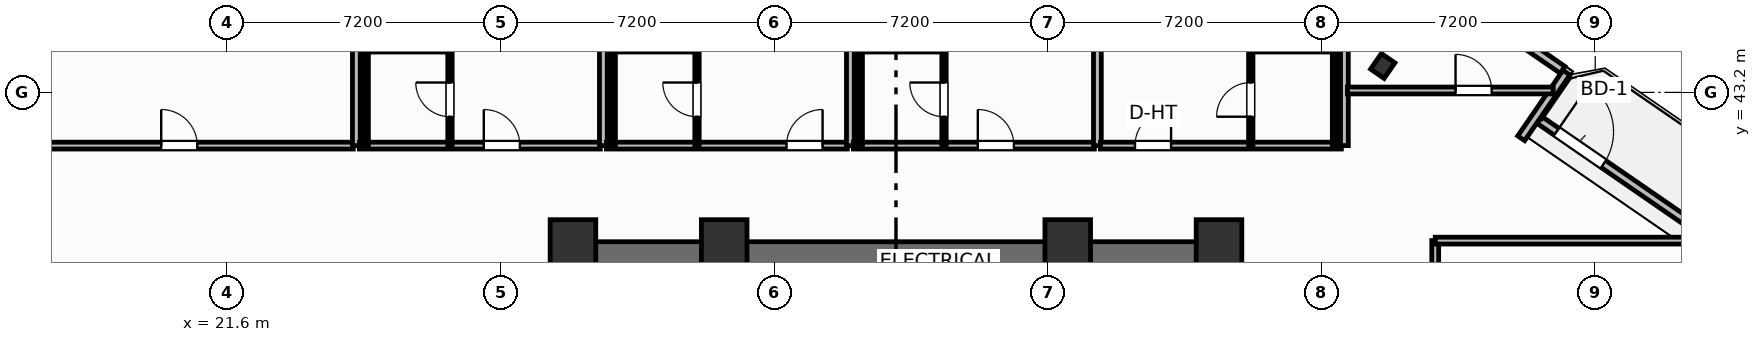
"""IFC4 building model, lengths in metres.
Left out: names, types, materials, properties, quantities, classifications, styles, units other than length and angle.
Written with IfcOpenShell. Run it as: python <this file> out.ifc"""

import sys

from ifc_helpers import new_model, si_unit, direction, frame, frame_2d, origin, origin_2d, place, context, subcontext, project, spatial, rectangle, i_section, extrude, element, fill, save


model = new_model("IFC4")
c1 = context("Model", 3, precision=1e-05, world=origin(), true_north=direction((0.0, 1.0)))
c2 = subcontext(c1, "Body", "Model", "MODEL_VIEW")
j1 = project(units=[si_unit("LENGTHUNIT", "METRE"), si_unit("PLANEANGLEUNIT", "RADIAN")], contexts=[c1])
p1 = place(None, origin())
s1 = spatial("IfcSite", under=j1, at=p1, CompositionType="ELEMENT")
p2 = place(p1, origin())
s2 = spatial("IfcBuilding", under=s1, at=p2, CompositionType="ELEMENT")
p3 = place(p2, frame((0.0, 0.0, 67.7)))
s3 = spatial("IfcBuildingStorey", under=s2, at=p3, CompositionType="ELEMENT", Elevation=67.7)
for number, where, z_axis, x_axis in (
    (1, (30.7, 39.05, 0.0), (0.0, 0.0, 1.0), (1.0, 0.0, 0.0)),
    (2, (34.68, 39.05, 0.0), (0.0, 0.0, 1.0), (1.0, 0.0, 0.0)),
    (3, (43.72, 39.05, 0.0), (0.0, 0.0, 1.0), (1.0, 0.0, 0.0)),
    (4, (47.7, 39.05, 0.0), (0.0, 0.0, 1.0), (1.0, 0.0, 0.0)),
):
    element("IfcColumn", number, at=place(p3, frame(where, z_axis=z_axis, x_axis=x_axis)), inside=s3, PredefinedType="COLUMN", context=c2, shape_type="SweptSolid", body=[
        extrude(rectangle(XDim=1.2, YDim=1.6, at=origin_2d()), origin(), (0.0, 0.0, 1.0), 3.7),
    ])
p4 = place(p3, frame((30.28, 38.845, 0.0), z_axis=(0.0, 0.0, 1.0), x_axis=(1.0, 0.0, 0.0)))
e5 = element("IfcWall", 5, at=p4, inside=s3, PredefinedType="SHEAR", context=c2, shape_type="SweptSolid", body=[
    extrude(rectangle(XDim=17.84, YDim=0.85, at=frame_2d((8.92, 0.0))), origin(), (0.0, 0.0, 1.0), 3.38),
])
p5 = place(p3, frame((52.009, 43.896, 0.0), z_axis=(0.0, 0.0, 1.0), x_axis=(0.823532597628, -0.567268949127, 0.0)))
e6 = element("IfcColumn", 6, at=p5, inside=s3, PredefinedType="COLUMN", context=c2, shape_type="SweptSolid", body=[
    extrude(i_section(OverallWidth=0.432, OverallDepth=0.498, WebThickness=0.056, FlangeThickness=0.089, FilletRadius=0.025, at=origin_2d()), origin(), (0.0, 0.0, 1.0), 3.7),
])
p6 = place(p3, frame((56.132, 42.476, 0.0), z_axis=(0.0, 0.0, 1.0), x_axis=(0.823534636215, -0.567265989598, 0.0)))
e7 = element("IfcWall", 7, at=p6, inside=s3, PredefinedType="SOLIDWALL", context=c2, shape_type="SweptSolid", body=[
    extrude(rectangle(XDim=6.0, YDim=0.22, at=frame_2d((3.0, 0.0))), origin(), (0.0, 0.0, 1.0), 2.66),
])
p7 = place(p6, frame((0.548, 0.0, 0.0)))
e8 = element("IfcOpeningElement", 8, at=p7, cuts=e7, PredefinedType="OPENING", context=c2, shape_type="SweptSolid", body=[
    extrude(rectangle(XDim=1.5, YDim=2.25, at=frame_2d((0.75, 1.125))), frame((0.0, 0.12, 0.0), z_axis=(0.0, -1.0, 0.0), x_axis=(1.0, 0.0, 0.0)), (0.0, 0.0, 1.0), 0.24),
])
p8 = place(p3, frame((55.653, 41.993, 0.0), z_axis=(0.0, 0.0, 1.0), x_axis=(0.567273696173, 0.823529327729, 0.0)))
e9 = element("IfcWall", 9, at=p8, inside=s3, PredefinedType="SOLIDWALL", context=c2, shape_type="SweptSolid", body=[
    extrude(rectangle(XDim=2.1, YDim=0.22, at=frame_2d((1.05, 0.0))), origin(), (0.0, 0.0, 1.0), 2.66),
])
p9 = place(p3, frame((56.741, 43.793, 0.0), z_axis=(0.0, 0.0, 1.0), x_axis=(-0.823530942962, 0.56727135128, 0.0)))
e10 = element("IfcWall", 10, at=p9, inside=s3, PredefinedType="SOLIDWALL", context=c2, shape_type="SweptSolid", body=[
    extrude(rectangle(XDim=8.035, YDim=0.22, at=frame_2d((4.018, 0.0))), origin(), (0.0, 0.0, 1.0), 2.66),
])
p10 = place(p9, frame((3.192, 0.0, 0.8)))
e11 = element("IfcOpeningElement", 11, at=p10, cuts=e10, PredefinedType="OPENING", context=c2, shape_type="SweptSolid", body=[
    extrude(rectangle(XDim=1.65, YDim=1.65, at=frame_2d((0.825, 0.825))), frame((0.0, 0.12, 0.0), z_axis=(0.0, -1.0, 0.0), x_axis=(1.0, 0.0, 0.0)), (0.0, 0.0, 1.0), 0.24),
])
p11 = place(p3, frame((3.176, 41.8, 0.0), z_axis=(0.0, 0.0, 1.0), x_axis=(1.0, 0.0, 0.0)))
e12 = element("IfcWall", 12, at=p11, inside=s3, PredefinedType="PARTITIONING", context=c2, shape_type="SweptSolid", body=[
    extrude(rectangle(XDim=21.744, YDim=0.18, at=frame_2d((10.872, 0.0))), origin(), (0.0, 0.0, 1.0), 3.38),
])
p12 = place(p11, frame((16.689, 0.0, 0.0)))
e13 = element("IfcOpeningElement", 13, at=p12, cuts=e12, PredefinedType="OPENING", context=c2, shape_type="SweptSolid", body=[
    extrude(rectangle(XDim=0.95, YDim=2.05, at=frame_2d((0.475, 1.025))), frame((0.0, 0.1, 0.0), z_axis=(0.0, -1.0, 0.0), x_axis=(1.0, 0.0, 0.0)), (0.0, 0.0, 1.0), 0.2),
])
p13 = place(p3, frame((25.0, 41.8, 0.0), z_axis=(0.0, 0.0, 1.0), x_axis=(0.0, 1.0, 0.0)))
e14 = element("IfcWall", 14, at=p13, inside=s3, PredefinedType="PARTITIONING", context=c2, shape_type="SweptSolid", body=[
    extrude(rectangle(XDim=14.2, YDim=0.205, at=frame_2d((7.1, 0.0))), origin(), (0.0, 0.0, 1.0), 3.38),
])
p14 = place(p3, frame((25.08, 41.8, 0.0), z_axis=(0.0, 0.0, 1.0), x_axis=(1.0, 0.0, 0.0)))
e15 = element("IfcWall", 15, at=p14, inside=s3, PredefinedType="PARTITIONING", context=c2, shape_type="SweptSolid", body=[
    extrude(rectangle(XDim=6.34, YDim=0.18, at=frame_2d((3.17, 0.0))), origin(), (0.0, 0.0, 1.0), 3.38),
])
p15 = place(p14, frame((3.274, 0.0, 0.0)))
e16 = element("IfcOpeningElement", 16, at=p15, cuts=e15, PredefinedType="OPENING", context=c2, shape_type="SweptSolid", body=[
    extrude(rectangle(XDim=0.95, YDim=2.15, at=frame_2d((0.475, 1.075))), frame((0.0, 0.1, 0.0), z_axis=(0.0, -1.0, 0.0), x_axis=(1.0, 0.0, 0.0)), (0.0, 0.0, 1.0), 0.2),
])
p16 = place(p3, frame((27.464, 41.8, 0.0), z_axis=(0.0, 0.0, 1.0), x_axis=(0.0, 1.0, 0.0)))
e17 = element("IfcWall", 17, at=p16, inside=s3, PredefinedType="PARTITIONING", context=c2, shape_type="SweptSolid", body=[
    extrude(rectangle(XDim=2.52, YDim=0.115, at=frame_2d((1.26, 0.0))), origin(), (0.0, 0.0, 1.0), 3.38),
])
p17 = place(p16, frame((0.76, 0.0, 0.0)))
e18 = element("IfcOpeningElement", 18, at=p17, cuts=e17, PredefinedType="OPENING", context=c2, shape_type="SweptSolid", body=[
    extrude(rectangle(XDim=0.9, YDim=2.05, at=frame_2d((0.45, 1.025))), frame((0.0, 0.067, 0.0), z_axis=(0.0, -1.0, 0.0), x_axis=(1.0, 0.0, 0.0)), (0.0, 0.0, 1.0), 0.135),
])
p18 = place(p3, frame((25.26, 41.8, 0.0), z_axis=(0.0, 0.0, 1.0), x_axis=(0.0, 1.0, 0.0)))
e19 = element("IfcWall", 19, at=p18, inside=s3, PredefinedType="PARTITIONING", context=c2, shape_type="SweptSolid", body=[
    extrude(rectangle(XDim=2.52, YDim=0.115, at=frame_2d((1.26, 0.0))), origin(), (0.0, 0.0, 1.0), 3.38),
])
p19 = place(p3, frame((31.5, 41.8, 0.0), z_axis=(0.0, 0.0, 1.0), x_axis=(0.0, 1.0, 0.0)))
e20 = element("IfcWall", 20, at=p19, inside=s3, PredefinedType="PARTITIONING", context=c2, shape_type="SweptSolid", body=[
    extrude(rectangle(XDim=14.2, YDim=0.205, at=frame_2d((7.1, 0.0))), origin(), (0.0, 0.0, 1.0), 3.38),
])
p20 = place(p3, frame((31.58, 41.8, 0.0), z_axis=(0.0, 0.0, 1.0), x_axis=(1.0, 0.0, 0.0)))
e21 = element("IfcWall", 21, at=p20, inside=s3, PredefinedType="PARTITIONING", context=c2, shape_type="SweptSolid", body=[
    extrude(rectangle(XDim=6.34, YDim=0.18, at=frame_2d((3.17, 0.0))), origin(), (0.0, 0.0, 1.0), 3.38),
])
p21 = place(p20, frame((4.739, 0.0, 0.0)))
e22 = element("IfcOpeningElement", 22, at=p21, cuts=e21, PredefinedType="OPENING", context=c2, shape_type="SweptSolid", body=[
    extrude(rectangle(XDim=0.95, YDim=2.15, at=frame_2d((0.475, 1.075))), frame((0.0, 0.1, 0.0), z_axis=(0.0, -1.0, 0.0), x_axis=(1.0, 0.0, 0.0)), (0.0, 0.0, 1.0), 0.2),
])
p22 = place(p3, frame((33.964, 41.8, 0.0), z_axis=(0.0, 0.0, 1.0), x_axis=(0.0, 1.0, 0.0)))
e23 = element("IfcWall", 23, at=p22, inside=s3, PredefinedType="PARTITIONING", context=c2, shape_type="SweptSolid", body=[
    extrude(rectangle(XDim=2.52, YDim=0.115, at=frame_2d((1.26, 0.0))), origin(), (0.0, 0.0, 1.0), 3.38),
])
p23 = place(p22, frame((0.76, 0.0, 0.0)))
e24 = element("IfcOpeningElement", 24, at=p23, cuts=e23, PredefinedType="OPENING", context=c2, shape_type="SweptSolid", body=[
    extrude(rectangle(XDim=0.9, YDim=2.05, at=frame_2d((0.45, 1.025))), frame((0.0, 0.067, 0.0), z_axis=(0.0, -1.0, 0.0), x_axis=(1.0, 0.0, 0.0)), (0.0, 0.0, 1.0), 0.135),
])
p24 = place(p3, frame((31.76, 41.8, 0.0), z_axis=(0.0, 0.0, 1.0), x_axis=(0.0, 1.0, 0.0)))
e25 = element("IfcWall", 25, at=p24, inside=s3, PredefinedType="PARTITIONING", context=c2, shape_type="SweptSolid", body=[
    extrude(rectangle(XDim=2.52, YDim=0.115, at=frame_2d((1.26, 0.0))), origin(), (0.0, 0.0, 1.0), 3.38),
])
p25 = place(p3, frame((38.0, 41.8, 0.0), z_axis=(0.0, 0.0, 1.0), x_axis=(0.0, 1.0, 0.0)))
e26 = element("IfcWall", 26, at=p25, inside=s3, PredefinedType="PARTITIONING", context=c2, shape_type="SweptSolid", body=[
    extrude(rectangle(XDim=14.797, YDim=0.205, at=frame_2d((7.398, 0.0))), origin(), (0.0, 0.0, 1.0), 3.38),
])
p26 = place(p3, frame((38.08, 41.8, 0.0), z_axis=(0.0, 0.0, 1.0), x_axis=(1.0, 0.0, 0.0)))
e27 = element("IfcWall", 27, at=p26, inside=s3, PredefinedType="PARTITIONING", context=c2, shape_type="SweptSolid", body=[
    extrude(rectangle(XDim=6.34, YDim=0.18, at=frame_2d((3.17, 0.0))), origin(), (0.0, 0.0, 1.0), 3.38),
])
p27 = place(p26, frame((3.274, 0.0, 0.0)))
e28 = element("IfcOpeningElement", 28, at=p27, cuts=e27, PredefinedType="OPENING", context=c2, shape_type="SweptSolid", body=[
    extrude(rectangle(XDim=0.95, YDim=2.15, at=frame_2d((0.475, 1.075))), frame((0.0, 0.1, 0.0), z_axis=(0.0, -1.0, 0.0), x_axis=(1.0, 0.0, 0.0)), (0.0, 0.0, 1.0), 0.2),
])
p28 = place(p3, frame((40.464, 41.8, 0.0), z_axis=(0.0, 0.0, 1.0), x_axis=(0.0, 1.0, 0.0)))
e29 = element("IfcWall", 29, at=p28, inside=s3, PredefinedType="PARTITIONING", context=c2, shape_type="SweptSolid", body=[
    extrude(rectangle(XDim=2.52, YDim=0.115, at=frame_2d((1.26, 0.0))), origin(), (0.0, 0.0, 1.0), 3.38),
])
p29 = place(p28, frame((0.76, 0.0, 0.0)))
e30 = element("IfcOpeningElement", 30, at=p29, cuts=e29, PredefinedType="OPENING", context=c2, shape_type="SweptSolid", body=[
    extrude(rectangle(XDim=0.9, YDim=2.05, at=frame_2d((0.45, 1.025))), frame((0.0, 0.067, 0.0), z_axis=(0.0, -1.0, 0.0), x_axis=(1.0, 0.0, 0.0)), (0.0, 0.0, 1.0), 0.135),
])
p30 = place(p3, frame((38.26, 41.8, 0.0), z_axis=(0.0, 0.0, 1.0), x_axis=(0.0, 1.0, 0.0)))
e31 = element("IfcWall", 31, at=p30, inside=s3, PredefinedType="PARTITIONING", context=c2, shape_type="SweptSolid", body=[
    extrude(rectangle(XDim=2.52, YDim=0.115, at=frame_2d((1.26, 0.0))), origin(), (0.0, 0.0, 1.0), 3.38),
])
p31 = place(p3, frame((44.5, 41.8, 0.0), z_axis=(0.0, 0.0, 1.0), x_axis=(0.0, 1.0, 0.0)))
e32 = element("IfcWall", 32, at=p31, inside=s3, PredefinedType="PARTITIONING", context=c2, shape_type="SweptSolid", body=[
    extrude(rectangle(XDim=8.583, YDim=0.205, at=frame_2d((4.292, 0.0))), origin(), (0.0, 0.0, 1.0), 3.38),
])
p32 = place(p3, frame((44.58, 41.8, 0.0), z_axis=(0.0, 0.0, 1.0), x_axis=(1.0, 0.0, 0.0)))
e33 = element("IfcWall", 33, at=p32, inside=s3, PredefinedType="PARTITIONING", context=c2, shape_type="SweptSolid", body=[
    extrude(rectangle(XDim=6.34, YDim=0.18, at=frame_2d((3.17, 0.0))), origin(), (0.0, 0.0, 1.0), 3.38),
])
p33 = place(p32, frame((0.91, 0.0, 0.0)))
e34 = element("IfcOpeningElement", 34, at=p33, cuts=e33, PredefinedType="OPENING", context=c2, shape_type="SweptSolid", body=[
    extrude(rectangle(XDim=0.95, YDim=2.15, at=frame_2d((0.475, 1.075))), frame((0.0, 0.1, 0.0), z_axis=(0.0, -1.0, 0.0), x_axis=(1.0, 0.0, 0.0)), (0.0, 0.0, 1.0), 0.2),
])
p34 = place(p3, frame((48.536, 41.8, 0.0), z_axis=(0.0, 0.0, 1.0), x_axis=(0.0, 1.0, 0.0)))
e35 = element("IfcWall", 35, at=p34, inside=s3, PredefinedType="PARTITIONING", context=c2, shape_type="SweptSolid", body=[
    extrude(rectangle(XDim=2.52, YDim=0.115, at=frame_2d((1.26, 0.0))), origin(), (0.0, 0.0, 1.0), 3.38),
])
p35 = place(p34, frame((0.76, 0.0, 0.0)))
e36 = element("IfcOpeningElement", 36, at=p35, cuts=e35, PredefinedType="OPENING", context=c2, shape_type="SweptSolid", body=[
    extrude(rectangle(XDim=0.9, YDim=2.05, at=frame_2d((0.45, 1.025))), frame((0.0, 0.067, 0.0), z_axis=(0.0, -1.0, 0.0), x_axis=(1.0, 0.0, 0.0)), (0.0, 0.0, 1.0), 0.135),
])
p36 = place(p3, frame((50.74, 41.8, 0.0), z_axis=(0.0, 0.0, 1.0), x_axis=(0.0, 1.0, 0.0)))
e37 = element("IfcWall", 37, at=p36, inside=s3, PredefinedType="PARTITIONING", context=c2, shape_type="SweptSolid", body=[
    extrude(rectangle(XDim=2.52, YDim=0.115, at=frame_2d((1.26, 0.0))), origin(), (0.0, 0.0, 1.0), 3.38),
])
p37 = place(p3, frame((51.0, 41.8, 0.0), z_axis=(0.0, 0.0, 1.0), x_axis=(0.0, 1.0, 0.0)))
e38 = element("IfcWall", 38, at=p37, inside=s3, PredefinedType="PARTITIONING", context=c2, shape_type="SweptSolid", body=[
    extrude(rectangle(XDim=5.923, YDim=0.205, at=frame_2d((2.961, 0.0))), origin(), (0.0, 0.0, 1.0), 3.38),
])
p38 = place(p3, frame((51.08, 43.25, 0.0), z_axis=(0.0, 0.0, 1.0), x_axis=(1.0, 0.0, 0.0)))
e39 = element("IfcWall", 39, at=p38, inside=s3, PredefinedType="PARTITIONING", context=c2, shape_type="SweptSolid", body=[
    extrude(rectangle(XDim=5.414, YDim=0.18, at=frame_2d((2.707, 0.0))), origin(), (0.0, 0.0, 1.0), 3.38),
])
p39 = place(p38, frame((2.844, 0.0, 0.0)))
e40 = element("IfcOpeningElement", 40, at=p39, cuts=e39, PredefinedType="OPENING", context=c2, shape_type="SweptSolid", body=[
    extrude(rectangle(XDim=0.95, YDim=2.05, at=frame_2d((0.475, 1.025))), frame((0.0, 0.1, 0.0), z_axis=(0.0, -1.0, 0.0), x_axis=(1.0, 0.0, 0.0)), (0.0, 0.0, 1.0), 0.2),
])
p40 = place(p3, frame((53.39, 26.84, 0.0), z_axis=(0.0, 0.0, 1.0), x_axis=(0.0, 1.0, 0.0)))
e41 = element("IfcWall", 41, at=p40, inside=s3, PredefinedType="PARTITIONING", context=c2, shape_type="SweptSolid", body=[
    extrude(rectangle(XDim=12.46, YDim=0.18, at=frame_2d((6.23, 0.0))), origin(), (0.0, 0.0, 1.0), 3.38),
])
p41 = place(p40, frame((0.618, 0.0, 0.0)))
e42 = element("IfcOpeningElement", 42, at=p41, cuts=e41, PredefinedType="OPENING", context=c2, shape_type="SweptSolid", body=[
    extrude(rectangle(XDim=0.92, YDim=2.05, at=frame_2d((0.46, 1.025))), frame((0.0, 0.1, 0.0), z_axis=(0.0, -1.0, 0.0), x_axis=(1.0, 0.0, 0.0)), (0.0, 0.0, 1.0), 0.2),
])
p42 = place(p3, frame((53.39, 39.3, 0.0), z_axis=(0.0, 0.0, 1.0), x_axis=(1.0, 0.0, 0.0)))
e43 = element("IfcWall", 43, at=p42, inside=s3, PredefinedType="PARTITIONING", context=c2, shape_type="SweptSolid", body=[
    extrude(rectangle(XDim=7.313, YDim=0.18, at=frame_2d((3.656, 0.0))), origin(), (0.0, 0.0, 1.0), 3.38),
])
p43 = place(p7, origin())
e44 = element("IfcDoor", 44, at=p43, inside=s3, OperationType="SINGLE_SWING_LEFT", PredefinedType="DOOR", context=c2, shape_type="SweptSolid", body=[
    extrude(rectangle(XDim=1.5, YDim=2.25, at=frame_2d((0.75, 1.125))), frame((0.0, 0.025, 0.0), z_axis=(0.0, -1.0, 0.0), x_axis=(1.0, 0.0, 0.0)), (0.0, 0.0, 1.0), 0.05),
])
fill(e8, e44)
p44 = place(p12, origin())
e45 = element("IfcDoor", 45, at=p44, inside=s3, OperationType="SINGLE_SWING_LEFT", PredefinedType="DOOR", context=c2, shape_type="SweptSolid", body=[
    extrude(rectangle(XDim=0.95, YDim=2.05, at=frame_2d((0.475, 1.025))), frame((0.0, 0.025, 0.0), z_axis=(0.0, -1.0, 0.0), x_axis=(1.0, 0.0, 0.0)), (0.0, 0.0, 1.0), 0.05),
])
fill(e13, e45)
p45 = place(p15, origin())
e46 = element("IfcDoor", 46, at=p45, inside=s3, OperationType="SINGLE_SWING_LEFT", PredefinedType="DOOR", context=c2, shape_type="SweptSolid", body=[
    extrude(rectangle(XDim=0.95, YDim=2.15, at=frame_2d((0.475, 1.075))), frame((0.0, 0.025, 0.0), z_axis=(0.0, -1.0, 0.0), x_axis=(1.0, 0.0, 0.0)), (0.0, 0.0, 1.0), 0.05),
])
fill(e16, e46)
p46 = place(p17, origin())
e47 = element("IfcDoor", 47, at=p46, inside=s3, OperationType="SINGLE_SWING_RIGHT", PredefinedType="DOOR", context=c2, shape_type="SweptSolid", body=[
    extrude(rectangle(XDim=0.9, YDim=2.05, at=frame_2d((0.45, 1.025))), frame((0.0, 0.025, 0.0), z_axis=(0.0, -1.0, 0.0), x_axis=(1.0, 0.0, 0.0)), (0.0, 0.0, 1.0), 0.05),
])
fill(e18, e47)
p47 = place(p21, origin())
e48 = element("IfcDoor", 48, at=p47, inside=s3, OperationType="SINGLE_SWING_RIGHT", PredefinedType="DOOR", context=c2, shape_type="SweptSolid", body=[
    extrude(rectangle(XDim=0.95, YDim=2.15, at=frame_2d((0.475, 1.075))), frame((0.0, 0.025, 0.0), z_axis=(0.0, -1.0, 0.0), x_axis=(1.0, 0.0, 0.0)), (0.0, 0.0, 1.0), 0.05),
])
fill(e22, e48)
p48 = place(p23, origin())
e49 = element("IfcDoor", 49, at=p48, inside=s3, OperationType="SINGLE_SWING_RIGHT", PredefinedType="DOOR", context=c2, shape_type="SweptSolid", body=[
    extrude(rectangle(XDim=0.9, YDim=2.05, at=frame_2d((0.45, 1.025))), frame((0.0, 0.025, 0.0), z_axis=(0.0, -1.0, 0.0), x_axis=(1.0, 0.0, 0.0)), (0.0, 0.0, 1.0), 0.05),
])
fill(e24, e49)
p49 = place(p27, origin())
e50 = element("IfcDoor", 50, at=p49, inside=s3, OperationType="SINGLE_SWING_LEFT", PredefinedType="DOOR", context=c2, shape_type="SweptSolid", body=[
    extrude(rectangle(XDim=0.95, YDim=2.15, at=frame_2d((0.475, 1.075))), frame((0.0, 0.025, 0.0), z_axis=(0.0, -1.0, 0.0), x_axis=(1.0, 0.0, 0.0)), (0.0, 0.0, 1.0), 0.05),
])
fill(e28, e50)
p50 = place(p29, origin())
e51 = element("IfcDoor", 51, at=p50, inside=s3, OperationType="SINGLE_SWING_RIGHT", PredefinedType="DOOR", context=c2, shape_type="SweptSolid", body=[
    extrude(rectangle(XDim=0.9, YDim=2.05, at=frame_2d((0.45, 1.025))), frame((0.0, 0.025, 0.0), z_axis=(0.0, -1.0, 0.0), x_axis=(1.0, 0.0, 0.0)), (0.0, 0.0, 1.0), 0.05),
])
fill(e30, e51)
p51 = place(p33, origin())
e52 = element("IfcDoor", 52, at=p51, inside=s3, OperationType="SINGLE_SWING_RIGHT", PredefinedType="DOOR", context=c2, shape_type="SweptSolid", body=[
    extrude(rectangle(XDim=0.95, YDim=2.15, at=frame_2d((0.475, 1.075))), frame((0.0, 0.025, 0.0), z_axis=(0.0, -1.0, 0.0), x_axis=(1.0, 0.0, 0.0)), (0.0, 0.0, 1.0), 0.05),
])
fill(e34, e52)
p52 = place(p35, origin())
e53 = element("IfcDoor", 53, at=p52, inside=s3, OperationType="SINGLE_SWING_LEFT", PredefinedType="DOOR", context=c2, shape_type="SweptSolid", body=[
    extrude(rectangle(XDim=0.9, YDim=2.05, at=frame_2d((0.45, 1.025))), frame((0.0, 0.025, 0.0), z_axis=(0.0, -1.0, 0.0), x_axis=(1.0, 0.0, 0.0)), (0.0, 0.0, 1.0), 0.05),
])
fill(e36, e53)
p53 = place(p39, origin())
e54 = element("IfcDoor", 54, at=p53, inside=s3, OperationType="SINGLE_SWING_LEFT", PredefinedType="DOOR", context=c2, shape_type="SweptSolid", body=[
    extrude(rectangle(XDim=0.95, YDim=2.05, at=frame_2d((0.475, 1.025))), frame((0.0, 0.025, 0.0), z_axis=(0.0, -1.0, 0.0), x_axis=(1.0, 0.0, 0.0)), (0.0, 0.0, 1.0), 0.05),
])
fill(e40, e54)
save(model, sys.argv[1])
